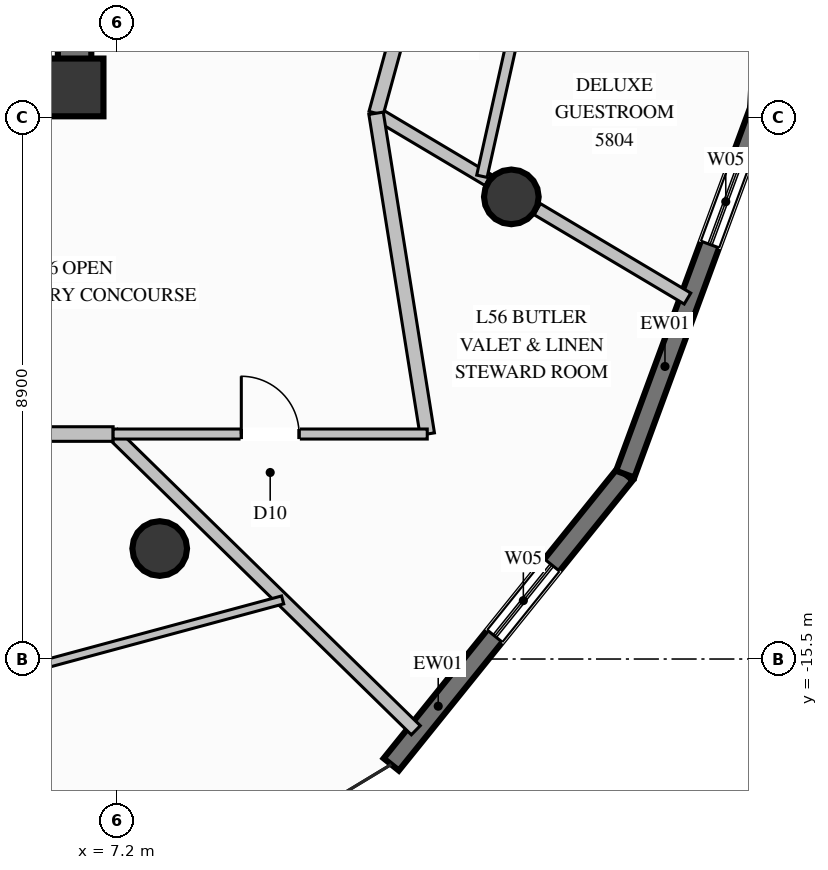
"""IFC4 building model, lengths in metres.
Left out: names, types, materials, properties, quantities, classifications, styles, units other than length and angle.
Written with IfcOpenShell. Run it as: python <this file> out.ifc"""

import sys

from ifc_helpers import new_model, si_unit, direction, frame, frame_2d, origin, origin_2d, place, context, subcontext, project, spatial, rectangle, circle, extrude, element, fill, save


model = new_model("IFC4")
c1 = context("Model", 3, precision=1e-05, world=origin(), true_north=direction((0.0, 1.0)))
c2 = subcontext(c1, "Body", "Model", "MODEL_VIEW")
j1 = project(units=[si_unit("LENGTHUNIT", "METRE"), si_unit("PLANEANGLEUNIT", "RADIAN")], contexts=[c1])
p1 = place(None, origin())
s1 = spatial("IfcSite", under=j1, at=p1, CompositionType="ELEMENT")
p2 = place(p1, origin())
s2 = spatial("IfcBuilding", under=s1, at=p2, CompositionType="ELEMENT")
p3 = place(p2, frame((0.0, 0.0, 216.4)))
s3 = spatial("IfcBuildingStorey", under=s2, at=p3, CompositionType="ELEMENT", Elevation=216.4)
p4 = place(p3, frame((6.5, -6.1, 0.0), z_axis=(0.0, 0.0, 1.0), x_axis=(1.0, 0.0, 0.0)))
e1 = element("IfcColumn", 1, at=p4, inside=s3, PredefinedType="COLUMN", context=c2, shape_type="SweptSolid", body=[
    extrude(rectangle(XDim=0.95, YDim=0.95, at=origin_2d()), origin(), (0.0, 0.0, 1.0), 3.6),
])
p5 = place(p3, frame((4.15, -6.1, 0.0), z_axis=(0.0, 0.0, 1.0), x_axis=(1.0, 0.0, 0.0)))
e2 = element("IfcWall", 2, at=p5, inside=s3, PredefinedType="SHEAR", context=c2, shape_type="SweptSolid", body=[
    extrude(rectangle(XDim=2.075, YDim=0.55, at=frame_2d((1.038, 0.0))), origin(), (0.0, 0.0, 1.0), 3.6),
])
p6 = place(p3, frame((6.5, -6.375, 0.0), z_axis=(0.0, 0.0, 1.0), x_axis=(0.0, 1.0, 0.0)))
e3 = element("IfcWall", 3, at=p6, inside=s3, PredefinedType="SHEAR", context=c2, shape_type="SweptSolid", body=[
    extrude(rectangle(XDim=4.025, YDim=0.55, at=frame_2d((2.012, 0.0))), origin(), (0.0, 0.0, 1.0), 3.6),
])
for number, where, z_axis, x_axis in (
    (4, (7.9, -13.683, 0.0), (0.0, 0.0, 1.0), (1.0, 0.0, 0.0)),
    (5, (13.683, -7.9, 0.0), (0.0, 0.0, 1.0), (1.0, 0.0, 0.0)),
):
    element("IfcColumn", number, at=place(p3, frame(where, z_axis=z_axis, x_axis=x_axis)), inside=s3, PredefinedType="COLUMN", context=c2, shape_type="SweptSolid", body=[
        extrude(circle(Radius=0.45, at=origin_2d()), origin(), (0.0, 0.0, 1.0), 3.6),
    ])
p7 = place(p3, frame((15.556, -12.46, 0.0), z_axis=(0.0, 0.0, 1.0), x_axis=(-0.627550861285, -0.778575568908, 0.0)))
e6 = element("IfcWall", 6, at=p7, inside=s3, PredefinedType="SOLIDWALL", context=c2, shape_type="SweptSolid", body=[
    extrude(rectangle(XDim=6.132, YDim=0.32, at=frame_2d((3.066, 0.0))), origin(), (0.0, 0.0, 1.0), 3.36),
])
p8 = place(p7, frame((1.92, 0.0, 0.85)))
e7 = element("IfcOpeningElement", 7, at=p8, cuts=e6, PredefinedType="OPENING", context=c2, shape_type="SweptSolid", body=[
    extrude(rectangle(XDim=1.5, YDim=1.2, at=frame_2d((0.75, 0.6))), frame((0.0, 0.17, 0.0), z_axis=(0.0, -1.0, 0.0), x_axis=(1.0, 0.0, 0.0)), (0.0, 0.0, 1.0), 0.34),
])
p9 = place(p3, frame((17.768, -6.466, 0.0), z_axis=(0.0, 0.0, 1.0), x_axis=(-0.346240086065, -0.938145938968, 0.0)))
e8 = element("IfcWall", 8, at=p9, inside=s3, PredefinedType="SOLIDWALL", context=c2, shape_type="SweptSolid", body=[
    extrude(rectangle(XDim=6.389, YDim=0.32, at=frame_2d((3.195, 0.0))), origin(), (0.0, 0.0, 1.0), 3.36),
])
p10 = place(p9, frame((0.863, 0.0, 0.85)))
e9 = element("IfcOpeningElement", 9, at=p10, cuts=e8, PredefinedType="OPENING", context=c2, shape_type="SweptSolid", body=[
    extrude(rectangle(XDim=1.5, YDim=1.2, at=frame_2d((0.75, 0.6))), frame((0.0, 0.17, 0.0), z_axis=(0.0, -1.0, 0.0), x_axis=(1.0, 0.0, 0.0)), (0.0, 0.0, 1.0), 0.34),
])
p11 = place(p3, frame((11.458, -6.525, 0.0), z_axis=(0.0, 0.0, 1.0), x_axis=(0.859303593583, -0.511465867928, 0.0)))
e10 = element("IfcWall", 10, at=p11, inside=s3, PredefinedType="PARTITIONING", context=c2, shape_type="SweptSolid", body=[
    extrude(rectangle(XDim=2.147, YDim=0.21, at=frame_2d((1.073, 0.0))), origin(), (0.0, 0.0, 1.0), 2.801),
])
p12 = place(p3, frame((14.108, -8.101, 0.0), z_axis=(0.0, 0.0, 1.0), x_axis=(0.859381683534, -0.511334647767, 0.0)))
e11 = element("IfcWall", 11, at=p12, inside=s3, PredefinedType="PARTITIONING", context=c2, shape_type="SweptSolid", body=[
    extrude(rectangle(XDim=2.877, YDim=0.21, at=frame_2d((1.438, 0.0))), origin(), (0.0, 0.0, 1.0), 3.36),
])
p13 = place(p3, frame((11.458, -6.525, 0.0), z_axis=(0.0, 0.0, 1.0), x_axis=(0.263735174528, 0.964595126318, 0.0)))
e12 = element("IfcWall", 12, at=p13, inside=s3, PredefinedType="PARTITIONING", context=c2, shape_type="SweptSolid", body=[
    extrude(rectangle(XDim=2.775, YDim=0.24, at=frame_2d((1.388, 0.0))), origin(), (0.0, 0.0, 1.0), 3.36),
])
p14 = place(p3, frame((13.199, -7.561, 0.0), z_axis=(0.0, 0.0, 1.0), x_axis=(0.217389338569, 0.976084973492, 0.0)))
e13 = element("IfcWall", 13, at=p14, inside=s3, PredefinedType="PLUMBINGWALL", context=c2, shape_type="SweptSolid", body=[
    extrude(rectangle(XDim=3.211, YDim=0.175, at=frame_2d((1.605, 0.0))), origin(), (0.0, 0.0, 1.0), 2.929),
])
p15 = place(p3, frame((7.134, -11.8, 0.0), z_axis=(0.0, 0.0, 1.0), x_axis=(0.714759358417, -0.699370473751, 0.0)))
e14 = element("IfcWall", 14, at=p15, inside=s3, PredefinedType="PARTITIONING", context=c2, shape_type="SweptSolid", body=[
    extrude(rectangle(XDim=6.965, YDim=0.21, at=frame_2d((3.482, 0.0))), origin(), (0.0, 0.0, 1.0), 3.36),
])
p16 = place(p3, frame((0.0, -11.8, 0.0), z_axis=(0.0, 0.0, 1.0), x_axis=(1.0, 0.0, 0.0)))
e15 = element("IfcWall", 15, at=p16, inside=s3, PredefinedType="PARTITIONING", context=c2, shape_type="SweptSolid", body=[
    extrude(rectangle(XDim=7.134, YDim=0.24, at=frame_2d((3.567, 0.0))), origin(), (0.0, 0.0, 1.0), 3.36),
])
p17 = place(p3, frame((0.25, -17.138, 0.0), z_axis=(0.0, 0.0, 1.0), x_axis=(0.965469486356, 0.260516162484, 0.0)))
e16 = element("IfcWall", 16, at=p17, inside=s3, PredefinedType="PARTITIONING", context=c2, shape_type="SweptSolid", body=[
    extrude(rectangle(XDim=10.018, YDim=0.135, at=frame_2d((5.009, 0.0))), origin(), (0.0, 0.0, 1.0), 3.36),
])
p18 = place(p17, frame((4.534, 0.0, 0.0)))
e17 = element("IfcOpeningElement", 17, at=p18, cuts=e16, PredefinedType="OPENING", context=c2, shape_type="SweptSolid", body=[
    extrude(rectangle(XDim=0.95, YDim=2.1, at=frame_2d((0.475, 1.05))), frame((0.0, 0.078, 0.0), z_axis=(0.0, -1.0, 0.0), x_axis=(1.0, 0.0, 0.0)), (0.0, 0.0, 1.0), 0.155),
])
p19 = place(p3, frame((12.3, -11.8, 0.0), z_axis=(0.0, 0.0, 1.0), x_axis=(-0.157628647668, 0.987498460472, 0.0)))
e18 = element("IfcWall", 18, at=p19, inside=s3, PredefinedType="PARTITIONING", context=c2, shape_type="SweptSolid", body=[
    extrude(rectangle(XDim=5.342, YDim=0.24, at=frame_2d((2.671, 0.0))), origin(), (0.0, 0.0, 1.0), 3.36),
])
p20 = place(p3, frame((7.134, -11.8, 0.0), z_axis=(0.0, 0.0, 1.0), x_axis=(1.0, 0.0, 0.0)))
e19 = element("IfcWall", 19, at=p20, inside=s3, PredefinedType="PARTITIONING", context=c2, shape_type="SweptSolid", body=[
    extrude(rectangle(XDim=5.166, YDim=0.165, at=frame_2d((2.583, 0.0))), origin(), (0.0, 0.0, 1.0), 3.36),
])
p21 = place(p20, frame((2.108, 0.0, 0.0)))
e20 = element("IfcOpeningElement", 20, at=p21, cuts=e19, PredefinedType="OPENING", context=c2, shape_type="SweptSolid", body=[
    extrude(rectangle(XDim=0.95, YDim=2.1, at=frame_2d((0.475, 1.05))), frame((0.0, 0.093, 0.0), z_axis=(0.0, -1.0, 0.0), x_axis=(1.0, 0.0, 0.0)), (0.0, 0.0, 1.0), 0.185),
])
p22 = place(p8, origin())
e21 = element("IfcWindow", 21, at=p22, inside=s3, PartitioningType="SINGLE_PANEL", PredefinedType="WINDOW", context=c2, shape_type="SweptSolid", body=[
    extrude(rectangle(XDim=1.5, YDim=1.2, at=frame_2d((0.75, 0.6))), frame((0.0, 0.03, 0.0), z_axis=(0.0, -1.0, 0.0), x_axis=(1.0, 0.0, 0.0)), (0.0, 0.0, 1.0), 0.06),
])
fill(e7, e21)
p23 = place(p10, origin())
e22 = element("IfcWindow", 22, at=p23, inside=s3, PartitioningType="SINGLE_PANEL", PredefinedType="WINDOW", context=c2, shape_type="SweptSolid", body=[
    extrude(rectangle(XDim=1.5, YDim=1.2, at=frame_2d((0.75, 0.6))), frame((0.0, 0.03, 0.0), z_axis=(0.0, -1.0, 0.0), x_axis=(1.0, 0.0, 0.0)), (0.0, 0.0, 1.0), 0.06),
])
fill(e9, e22)
p24 = place(p21, origin())
e23 = element("IfcDoor", 23, at=p24, inside=s3, OperationType="SINGLE_SWING_LEFT", PredefinedType="DOOR", context=c2, shape_type="SweptSolid", body=[
    extrude(rectangle(XDim=0.95, YDim=2.1, at=frame_2d((0.475, 1.05))), frame((0.0, 0.025, 0.0), z_axis=(0.0, -1.0, 0.0), x_axis=(1.0, 0.0, 0.0)), (0.0, 0.0, 1.0), 0.05),
])
fill(e20, e23)
save(model, sys.argv[1])
